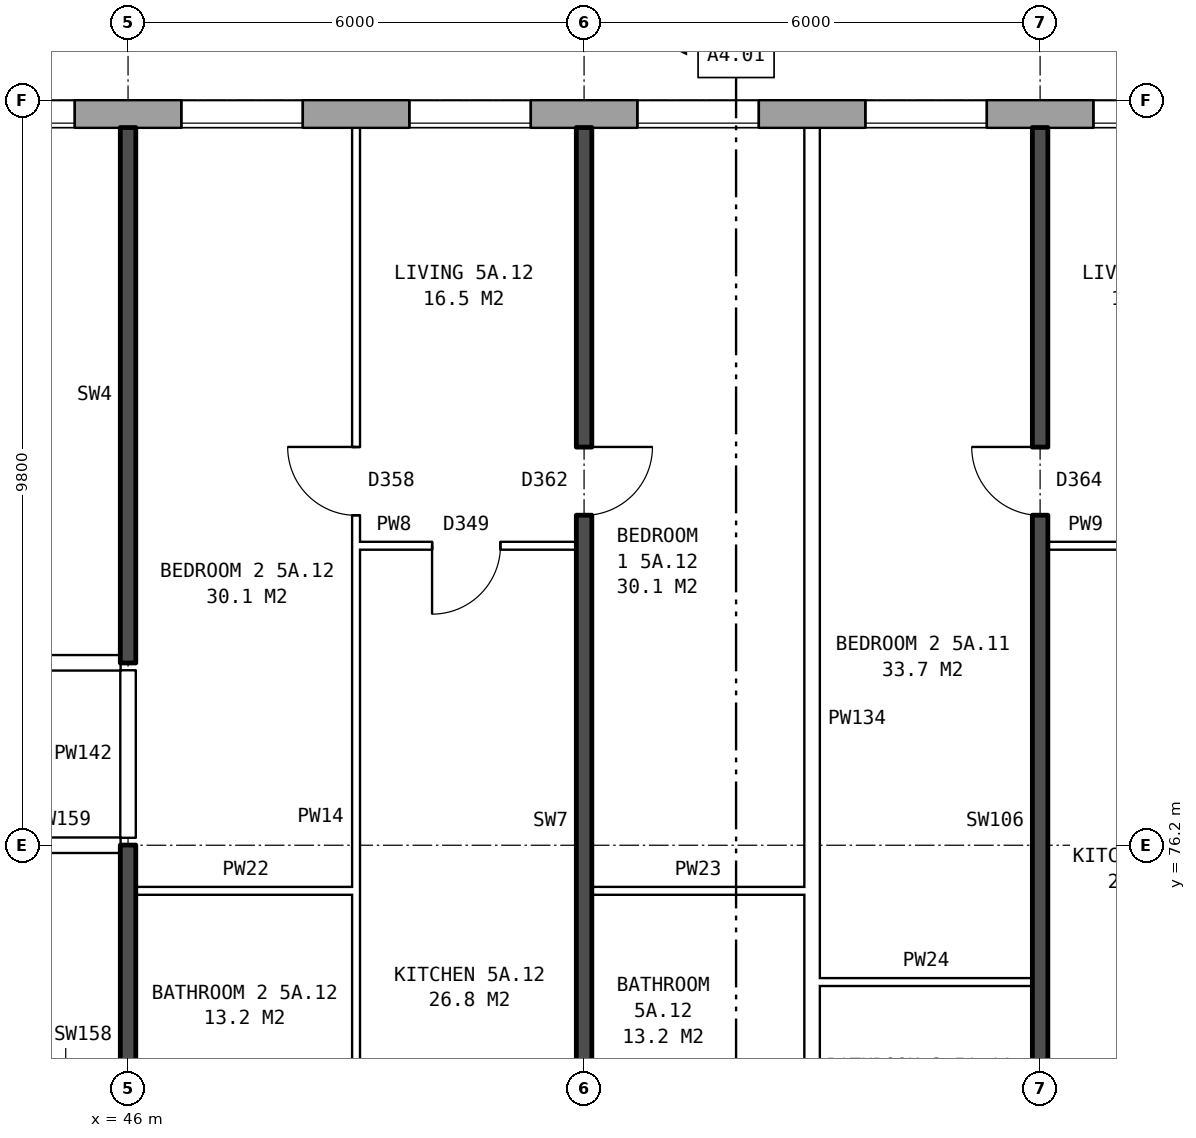
"""IFC4 building model, lengths in metres.
Left out: names, types, materials, properties, quantities, classifications, styles, units other than length and angle.
Written with IfcOpenShell. Run it as: python <this file> out.ifc"""

import sys

from ifc_helpers import new_model, si_unit, direction, frame, frame_2d, origin, place, context, subcontext, project, spatial, rectangle, extrude, element, fill, save


model = new_model("IFC4")
c1 = context("Model", 3, precision=1e-05, world=origin(), true_north=direction((0.0, 1.0)))
c2 = subcontext(c1, "Body", "Model", "MODEL_VIEW")
j1 = project(units=[si_unit("LENGTHUNIT", "METRE"), si_unit("PLANEANGLEUNIT", "RADIAN")], contexts=[c1])
p1 = place(None, origin())
s1 = spatial("IfcSite", under=j1, at=p1, CompositionType="ELEMENT")
p2 = place(p1, origin())
s2 = spatial("IfcBuilding", under=s1, at=p2, CompositionType="ELEMENT")
p3 = place(p2, frame((0.0, 0.0, 22.6)))
s3 = spatial("IfcBuildingStorey", under=s2, at=p3, CompositionType="ELEMENT", Elevation=22.6)
p4 = place(p3, frame((72.925, 85.82, 0.0), z_axis=(0.0, 0.0, 1.0), x_axis=(-1.0, 0.0, 0.0)))
e1 = element("IfcWall", 1, at=p4, inside=s3, PredefinedType="STANDARD", context=c2, shape_type="SweptSolid", body=[
    extrude(rectangle(XDim=50.101, YDim=0.36, at=frame_2d((25.05, 0.0))), origin(), (0.0, 0.0, 1.0), 2.85),
])
p5 = place(p4, frame((0.625, 0.0, 0.8)))
e2 = element("IfcOpeningElement", 2, at=p5, cuts=e1, PredefinedType="OPENING", context=c2, shape_type="SweptSolid", body=[
    extrude(rectangle(XDim=1.6, YDim=1.8, at=frame_2d((0.8, 0.9))), frame((0.0, 0.19, 0.0), z_axis=(0.0, -1.0, 0.0), x_axis=(1.0, 0.0, 0.0)), (0.0, 0.0, 1.0), 0.38),
])
p6 = place(p4, frame((3.125, 0.0, 1.7)))
e3 = element("IfcOpeningElement", 3, at=p6, cuts=e1, PredefinedType="OPENING", context=c2, shape_type="SweptSolid", body=[
    extrude(rectangle(XDim=0.8, YDim=0.9, at=frame_2d((0.4, 0.45))), frame((0.0, 0.19, 0.0), z_axis=(0.0, -1.0, 0.0), x_axis=(1.0, 0.0, 0.0)), (0.0, 0.0, 1.0), 0.38),
])
p7 = place(p4, frame((6.625, 0.0, 0.8)))
e4 = element("IfcOpeningElement", 4, at=p7, cuts=e1, PredefinedType="OPENING", context=c2, shape_type="SweptSolid", body=[
    extrude(rectangle(XDim=1.6, YDim=1.8, at=frame_2d((0.8, 0.9))), frame((0.0, 0.19, 0.0), z_axis=(0.0, -1.0, 0.0), x_axis=(1.0, 0.0, 0.0)), (0.0, 0.0, 1.0), 0.38),
])
p8 = place(p4, frame((9.625, 0.0, 0.8)))
e5 = element("IfcOpeningElement", 5, at=p8, cuts=e1, PredefinedType="OPENING", context=c2, shape_type="SweptSolid", body=[
    extrude(rectangle(XDim=1.6, YDim=1.8, at=frame_2d((0.8, 0.9))), frame((0.0, 0.19, 0.0), z_axis=(0.0, -1.0, 0.0), x_axis=(1.0, 0.0, 0.0)), (0.0, 0.0, 1.0), 0.38),
])
p9 = place(p4, frame((12.625, 0.0, 0.8)))
e6 = element("IfcOpeningElement", 6, at=p9, cuts=e1, PredefinedType="OPENING", context=c2, shape_type="SweptSolid", body=[
    extrude(rectangle(XDim=1.6, YDim=1.8, at=frame_2d((0.8, 0.9))), frame((0.0, 0.19, 0.0), z_axis=(0.0, -1.0, 0.0), x_axis=(1.0, 0.0, 0.0)), (0.0, 0.0, 1.0), 0.38),
])
p10 = place(p4, frame((15.625, 0.0, 0.8)))
e7 = element("IfcOpeningElement", 7, at=p10, cuts=e1, PredefinedType="OPENING", context=c2, shape_type="SweptSolid", body=[
    extrude(rectangle(XDim=1.6, YDim=1.8, at=frame_2d((0.8, 0.9))), frame((0.0, 0.19, 0.0), z_axis=(0.0, -1.0, 0.0), x_axis=(1.0, 0.0, 0.0)), (0.0, 0.0, 1.0), 0.38),
])
p11 = place(p4, frame((18.625, 0.0, 0.8)))
e8 = element("IfcOpeningElement", 8, at=p11, cuts=e1, PredefinedType="OPENING", context=c2, shape_type="SweptSolid", body=[
    extrude(rectangle(XDim=1.6, YDim=1.8, at=frame_2d((0.8, 0.9))), frame((0.0, 0.19, 0.0), z_axis=(0.0, -1.0, 0.0), x_axis=(1.0, 0.0, 0.0)), (0.0, 0.0, 1.0), 0.38),
])
p12 = place(p4, frame((21.625, 0.0, 0.8)))
e9 = element("IfcOpeningElement", 9, at=p12, cuts=e1, PredefinedType="OPENING", context=c2, shape_type="SweptSolid", body=[
    extrude(rectangle(XDim=1.6, YDim=1.8, at=frame_2d((0.8, 0.9))), frame((0.0, 0.19, 0.0), z_axis=(0.0, -1.0, 0.0), x_axis=(1.0, 0.0, 0.0)), (0.0, 0.0, 1.0), 0.38),
])
p13 = place(p4, frame((24.625, 0.0, 0.8)))
e10 = element("IfcOpeningElement", 10, at=p13, cuts=e1, PredefinedType="OPENING", context=c2, shape_type="SweptSolid", body=[
    extrude(rectangle(XDim=1.6, YDim=1.8, at=frame_2d((0.8, 0.9))), frame((0.0, 0.19, 0.0), z_axis=(0.0, -1.0, 0.0), x_axis=(1.0, 0.0, 0.0)), (0.0, 0.0, 1.0), 0.38),
])
p14 = place(p4, frame((27.625, 0.0, 0.8)))
e11 = element("IfcOpeningElement", 11, at=p14, cuts=e1, PredefinedType="OPENING", context=c2, shape_type="SweptSolid", body=[
    extrude(rectangle(XDim=1.6, YDim=1.8, at=frame_2d((0.8, 0.9))), frame((0.0, 0.19, 0.0), z_axis=(0.0, -1.0, 0.0), x_axis=(1.0, 0.0, 0.0)), (0.0, 0.0, 1.0), 0.38),
])
p15 = place(p4, frame((30.625, 0.0, 0.8)))
e12 = element("IfcOpeningElement", 12, at=p15, cuts=e1, PredefinedType="OPENING", context=c2, shape_type="SweptSolid", body=[
    extrude(rectangle(XDim=1.6, YDim=1.8, at=frame_2d((0.8, 0.9))), frame((0.0, 0.19, 0.0), z_axis=(0.0, -1.0, 0.0), x_axis=(1.0, 0.0, 0.0)), (0.0, 0.0, 1.0), 0.38),
])
p16 = place(p4, frame((33.625, 0.0, 0.8)))
e13 = element("IfcOpeningElement", 13, at=p16, cuts=e1, PredefinedType="OPENING", context=c2, shape_type="SweptSolid", body=[
    extrude(rectangle(XDim=1.6, YDim=1.8, at=frame_2d((0.8, 0.9))), frame((0.0, 0.19, 0.0), z_axis=(0.0, -1.0, 0.0), x_axis=(1.0, 0.0, 0.0)), (0.0, 0.0, 1.0), 0.38),
])
p17 = place(p4, frame((36.625, 0.0, 0.8)))
e14 = element("IfcOpeningElement", 14, at=p17, cuts=e1, PredefinedType="OPENING", context=c2, shape_type="SweptSolid", body=[
    extrude(rectangle(XDim=1.6, YDim=1.8, at=frame_2d((0.8, 0.9))), frame((0.0, 0.19, 0.0), z_axis=(0.0, -1.0, 0.0), x_axis=(1.0, 0.0, 0.0)), (0.0, 0.0, 1.0), 0.38),
])
p18 = place(p4, frame((39.625, 0.0, 0.8)))
e15 = element("IfcOpeningElement", 15, at=p18, cuts=e1, PredefinedType="OPENING", context=c2, shape_type="SweptSolid", body=[
    extrude(rectangle(XDim=1.6, YDim=1.8, at=frame_2d((0.8, 0.9))), frame((0.0, 0.19, 0.0), z_axis=(0.0, -1.0, 0.0), x_axis=(1.0, 0.0, 0.0)), (0.0, 0.0, 1.0), 0.38),
])
p19 = place(p4, frame((41.525, 0.0, 0.8)))
e16 = element("IfcOpeningElement", 16, at=p19, cuts=e1, PredefinedType="OPENING", context=c2, shape_type="SweptSolid", body=[
    extrude(rectangle(XDim=1.6, YDim=1.8, at=frame_2d((0.8, 0.9))), frame((0.0, 0.19, 0.0), z_axis=(0.0, -1.0, 0.0), x_axis=(1.0, 0.0, 0.0)), (0.0, 0.0, 1.0), 0.38),
])
p20 = place(p4, frame((46.525, 0.0, 1.4)))
e17 = element("IfcOpeningElement", 17, at=p20, cuts=e1, PredefinedType="OPENING", context=c2, shape_type="SweptSolid", body=[
    extrude(rectangle(XDim=1.0, YDim=1.2, at=frame_2d((0.5, 0.6))), frame((0.0, 0.19, 0.0), z_axis=(0.0, -1.0, 0.0), x_axis=(1.0, 0.0, 0.0)), (0.0, 0.0, 1.0), 0.38),
])
p21 = place(p4, frame((5.475, 0.0, 0.8)))
e18 = element("IfcOpeningElement", 18, at=p21, cuts=e1, PredefinedType="OPENING", context=c2, shape_type="SweptSolid", body=[
    extrude(rectangle(XDim=0.8, YDim=0.9, at=frame_2d((0.4, 0.45))), frame((0.0, 0.19, 0.0), z_axis=(0.0, -1.0, 0.0), x_axis=(1.0, 0.0, 0.0)), (0.0, 0.0, 1.0), 0.38),
])
p22 = place(p4, frame((43.425, 0.0, 0.8)))
e19 = element("IfcOpeningElement", 19, at=p22, cuts=e1, PredefinedType="OPENING", context=c2, shape_type="SweptSolid", body=[
    extrude(rectangle(XDim=0.6, YDim=1.2, at=frame_2d((0.3, 0.6))), frame((0.0, 0.19, 0.0), z_axis=(0.0, -1.0, 0.0), x_axis=(1.0, 0.0, 0.0)), (0.0, 0.0, 1.0), 0.38),
])
p23 = place(p4, frame((47.825, 0.0, 0.8)))
e20 = element("IfcOpeningElement", 20, at=p23, cuts=e1, PredefinedType="OPENING", context=c2, shape_type="SweptSolid", body=[
    extrude(rectangle(XDim=1.4, YDim=1.8, at=frame_2d((0.7, 0.9))), frame((0.0, 0.19, 0.0), z_axis=(0.0, -1.0, 0.0), x_axis=(1.0, 0.0, 0.0)), (0.0, 0.0, 1.0), 0.38),
])
p24 = place(p3, frame((55.1, 74.4, 0.0), z_axis=(0.0, 0.0, 1.0), x_axis=(1.0, 0.0, 0.0)))
e21 = element("IfcWall", 21, at=p24, inside=s3, PredefinedType="PARTITIONING", context=c2, shape_type="SweptSolid", body=[
    extrude(rectangle(XDim=2.8, YDim=0.1, at=frame_2d((1.4, 0.0))), origin(), (0.0, 0.0, 1.0), 2.85),
])
p25 = place(p3, frame((46.1, 75.6, 0.0), z_axis=(0.0, 0.0, 1.0), x_axis=(1.0, 0.0, 0.0)))
e22 = element("IfcWall", 22, at=p25, inside=s3, PredefinedType="PARTITIONING", context=c2, shape_type="SweptSolid", body=[
    extrude(rectangle(XDim=2.9, YDim=0.1, at=frame_2d((1.45, 0.0))), origin(), (0.0, 0.0, 1.0), 2.85),
])
p26 = place(p3, frame((52.1, 75.6, 0.0), z_axis=(0.0, 0.0, 1.0), x_axis=(1.0, 0.0, 0.0)))
e23 = element("IfcWall", 23, at=p26, inside=s3, PredefinedType="PARTITIONING", context=c2, shape_type="SweptSolid", body=[
    extrude(rectangle(XDim=2.8, YDim=0.1, at=frame_2d((1.4, 0.0))), origin(), (0.0, 0.0, 1.0), 2.85),
])
p27 = place(p3, frame((44.36, 76.2, 0.0), z_axis=(0.0, 0.0, 1.0), x_axis=(1.0, 0.0, 0.0)))
e24 = element("IfcWall", 24, at=p27, inside=s3, PredefinedType="PARTITIONING", context=c2, shape_type="SweptSolid", body=[
    extrude(rectangle(XDim=1.54, YDim=0.2, at=frame_2d((0.77, 0.0))), origin(), (0.0, 0.0, 1.0), 2.85),
])
p28 = place(p3, frame((20.11, 78.6, 0.0), z_axis=(0.0, 0.0, 1.0), x_axis=(1.0, 0.0, 0.0)))
e25 = element("IfcWall", 25, at=p28, inside=s3, PredefinedType="PARTITIONING", context=c2, shape_type="SweptSolid", body=[
    extrude(rectangle(XDim=25.79, YDim=0.2, at=frame_2d((12.895, 0.0))), origin(), (0.0, 0.0, 1.0), 2.85),
])
p29 = place(p28, frame((22.34, 0.0, 0.0)))
e26 = element("IfcOpeningElement", 26, at=p29, cuts=e25, PredefinedType="OPENING", context=c2, shape_type="SweptSolid", body=[
    extrude(rectangle(XDim=1.0, YDim=2.1, at=frame_2d((0.5, 1.05))), frame((0.0, 0.11, 0.0), z_axis=(0.0, -1.0, 0.0), x_axis=(1.0, 0.0, 0.0)), (0.0, 0.0, 1.0), 0.22),
])
p30 = place(p28, frame((10.39, 0.0, 0.0)))
e27 = element("IfcOpeningElement", 27, at=p30, cuts=e25, PredefinedType="OPENING", context=c2, shape_type="SweptSolid", body=[
    extrude(rectangle(XDim=1.0, YDim=2.1, at=frame_2d((0.5, 1.05))), frame((0.0, 0.11, 0.0), z_axis=(0.0, -1.0, 0.0), x_axis=(1.0, 0.0, 0.0)), (0.0, 0.0, 1.0), 0.22),
])
p31 = place(p28, frame((2.245, 0.0, 0.0)))
e28 = element("IfcOpeningElement", 28, at=p31, cuts=e25, PredefinedType="OPENING", context=c2, shape_type="SweptSolid", body=[
    extrude(rectangle(XDim=1.0, YDim=2.1, at=frame_2d((0.5, 1.05))), frame((0.0, 0.11, 0.0), z_axis=(0.0, -1.0, 0.0), x_axis=(1.0, 0.0, 0.0)), (0.0, 0.0, 1.0), 0.22),
])
p32 = place(p3, frame((49.0, 80.14, 0.0), z_axis=(0.0, 0.0, 1.0), x_axis=(1.0, 0.0, 0.0)))
e29 = element("IfcWall", 29, at=p32, inside=s3, PredefinedType="PARTITIONING", context=c2, shape_type="SweptSolid", body=[
    extrude(rectangle(XDim=2.9, YDim=0.1, at=frame_2d((1.45, 0.0))), origin(), (0.0, 0.0, 1.0), 2.85),
])
p33 = place(p32, frame((1.0, 0.0, 0.0)))
e30 = element("IfcOpeningElement", 30, at=p33, cuts=e29, PredefinedType="OPENING", context=c2, shape_type="SweptSolid", body=[
    extrude(rectangle(XDim=0.9, YDim=2.1, at=frame_2d((0.45, 1.05))), frame((0.0, 0.06, 0.0), z_axis=(0.0, -1.0, 0.0), x_axis=(1.0, 0.0, 0.0)), (0.0, 0.0, 1.0), 0.12),
])
p34 = place(p3, frame((58.1, 80.14, 0.0), z_axis=(0.0, 0.0, 1.0), x_axis=(1.0, 0.0, 0.0)))
e31 = element("IfcWall", 31, at=p34, inside=s3, PredefinedType="PARTITIONING", context=c2, shape_type="SweptSolid", body=[
    extrude(rectangle(XDim=2.9, YDim=0.1, at=frame_2d((1.45, 0.0))), origin(), (0.0, 0.0, 1.0), 2.85),
])
p35 = place(p34, frame((1.0, 0.0, 0.0)))
e32 = element("IfcOpeningElement", 32, at=p35, cuts=e31, PredefinedType="OPENING", context=c2, shape_type="SweptSolid", body=[
    extrude(rectangle(XDim=0.9, YDim=2.1, at=frame_2d((0.45, 1.05))), frame((0.0, 0.06, 0.0), z_axis=(0.0, -1.0, 0.0), x_axis=(1.0, 0.0, 0.0)), (0.0, 0.0, 1.0), 0.12),
])
p36 = place(p3, frame((46.0, 71.2, 0.0), z_axis=(0.0, 0.0, 1.0), x_axis=(0.0, 1.0, 0.0)))
e33 = element("IfcWall", 33, at=p36, inside=s3, PredefinedType="SOLIDWALL", context=c2, shape_type="SweptSolid", body=[
    extrude(rectangle(XDim=5.0, YDim=0.2, at=frame_2d((2.5, 0.0))), origin(), (0.0, 0.0, 1.0), 2.85),
])
p37 = place(p3, frame((46.0, 76.3, 0.0), z_axis=(0.0, 0.0, 1.0), x_axis=(0.0, 1.0, 0.0)))
e34 = element("IfcWall", 34, at=p37, inside=s3, PredefinedType="PARTITIONING", context=c2, shape_type="SweptSolid", body=[
    extrude(rectangle(XDim=2.2, YDim=0.2, at=frame_2d((1.1, 0.0))), origin(), (0.0, 0.0, 1.0), 2.85),
])
p38 = place(p3, frame((46.0, 78.6, 0.0), z_axis=(0.0, 0.0, 1.0), x_axis=(0.0, 1.0, 0.0)))
e35 = element("IfcWall", 35, at=p38, inside=s3, PredefinedType="SOLIDWALL", context=c2, shape_type="SweptSolid", body=[
    extrude(rectangle(XDim=7.04, YDim=0.2, at=frame_2d((3.52, 0.0))), origin(), (0.0, 0.0, 1.0), 2.85),
])
p39 = place(p3, frame((49.0, 71.3, 0.0), z_axis=(0.0, 0.0, 1.0), x_axis=(0.0, 1.0, 0.0)))
e36 = element("IfcWall", 36, at=p39, inside=s3, PredefinedType="PARTITIONING", context=c2, shape_type="SweptSolid", body=[
    extrude(rectangle(XDim=14.34, YDim=0.1, at=frame_2d((7.17, 0.0))), origin(), (0.0, 0.0, 1.0), 2.85),
])
p40 = place(p39, frame((9.24, 0.0, 0.0)))
e37 = element("IfcOpeningElement", 37, at=p40, cuts=e36, PredefinedType="OPENING", context=c2, shape_type="SweptSolid", body=[
    extrude(rectangle(XDim=0.9, YDim=2.1, at=frame_2d((0.45, 1.05))), frame((0.0, 0.06, 0.0), z_axis=(0.0, -1.0, 0.0), x_axis=(1.0, 0.0, 0.0)), (0.0, 0.0, 1.0), 0.12),
])
p41 = place(p39, frame((0.4, 0.0, 0.0)))
e38 = element("IfcOpeningElement", 38, at=p41, cuts=e36, PredefinedType="OPENING", context=c2, shape_type="SweptSolid", body=[
    extrude(rectangle(XDim=0.9, YDim=2.1, at=frame_2d((0.45, 1.05))), frame((0.0, 0.06, 0.0), z_axis=(0.0, -1.0, 0.0), x_axis=(1.0, 0.0, 0.0)), (0.0, 0.0, 1.0), 0.12),
])
p42 = place(p3, frame((52.0, 71.2, 0.0), z_axis=(0.0, 0.0, 1.0), x_axis=(0.0, 1.0, 0.0)))
e39 = element("IfcWall", 39, at=p42, inside=s3, PredefinedType="SOLIDWALL", context=c2, shape_type="SweptSolid", body=[
    extrude(rectangle(XDim=14.44, YDim=0.2, at=frame_2d((7.22, 0.0))), origin(), (0.0, 0.0, 1.0), 2.85),
])
p43 = place(p42, frame((9.34, 0.0, 0.0)))
e40 = element("IfcOpeningElement", 40, at=p43, cuts=e39, PredefinedType="OPENING", context=c2, shape_type="SweptSolid", body=[
    extrude(rectangle(XDim=0.9, YDim=2.1, at=frame_2d((0.45, 1.05))), frame((0.0, 0.11, 0.0), z_axis=(0.0, -1.0, 0.0), x_axis=(1.0, 0.0, 0.0)), (0.0, 0.0, 1.0), 0.22),
])
p44 = place(p42, frame((0.4, 0.0, 0.0)))
e41 = element("IfcOpeningElement", 41, at=p44, cuts=e39, PredefinedType="OPENING", context=c2, shape_type="SweptSolid", body=[
    extrude(rectangle(XDim=0.9, YDim=2.1, at=frame_2d((0.45, 1.05))), frame((0.0, 0.11, 0.0), z_axis=(0.0, -1.0, 0.0), x_axis=(1.0, 0.0, 0.0)), (0.0, 0.0, 1.0), 0.22),
])
p45 = place(p3, frame((55.0, 71.3, 0.0), z_axis=(0.0, 0.0, 1.0), x_axis=(0.0, 1.0, 0.0)))
e42 = element("IfcWall", 42, at=p45, inside=s3, PredefinedType="PARTITIONING", context=c2, shape_type="SweptSolid", body=[
    extrude(rectangle(XDim=14.34, YDim=0.2, at=frame_2d((7.17, 0.0))), origin(), (0.0, 0.0, 1.0), 2.85),
])
p46 = place(p3, frame((58.0, 71.2, 0.0), z_axis=(0.0, 0.0, 1.0), x_axis=(0.0, 1.0, 0.0)))
e43 = element("IfcWall", 43, at=p46, inside=s3, PredefinedType="SOLIDWALL", context=c2, shape_type="SweptSolid", body=[
    extrude(rectangle(XDim=14.44, YDim=0.2, at=frame_2d((7.22, 0.0))), origin(), (0.0, 0.0, 1.0), 2.85),
])
p47 = place(p46, frame((9.34, 0.0, 0.0)))
e44 = element("IfcOpeningElement", 44, at=p47, cuts=e43, PredefinedType="OPENING", context=c2, shape_type="SweptSolid", body=[
    extrude(rectangle(XDim=0.9, YDim=2.1, at=frame_2d((0.45, 1.05))), frame((0.0, 0.11, 0.0), z_axis=(0.0, -1.0, 0.0), x_axis=(1.0, 0.0, 0.0)), (0.0, 0.0, 1.0), 0.22),
])
p48 = place(p46, frame((0.4, 0.0, 0.0)))
e45 = element("IfcOpeningElement", 45, at=p48, cuts=e43, PredefinedType="OPENING", context=c2, shape_type="SweptSolid", body=[
    extrude(rectangle(XDim=0.9, YDim=2.1, at=frame_2d((0.45, 1.05))), frame((0.0, 0.11, 0.0), z_axis=(0.0, -1.0, 0.0), x_axis=(1.0, 0.0, 0.0)), (0.0, 0.0, 1.0), 0.22),
])
p49 = place(p9, origin())
e46 = element("IfcWindow", 46, at=p49, inside=s3, PartitioningType="SINGLE_PANEL", PredefinedType="WINDOW", context=c2, shape_type="SweptSolid", body=[
    extrude(rectangle(XDim=1.6, YDim=1.8, at=frame_2d((0.8, 0.9))), frame((0.0, 0.15, 0.0), z_axis=(0.0, -1.0, 0.0), x_axis=(1.0, 0.0, 0.0)), (0.0, 0.0, 1.0), 0.06),
])
fill(e6, e46)
p50 = place(p10, origin())
e47 = element("IfcWindow", 47, at=p50, inside=s3, PartitioningType="SINGLE_PANEL", PredefinedType="WINDOW", context=c2, shape_type="SweptSolid", body=[
    extrude(rectangle(XDim=1.6, YDim=1.8, at=frame_2d((0.8, 0.9))), frame((0.0, 0.15, 0.0), z_axis=(0.0, -1.0, 0.0), x_axis=(1.0, 0.0, 0.0)), (0.0, 0.0, 1.0), 0.06),
])
fill(e7, e47)
p51 = place(p11, origin())
e48 = element("IfcWindow", 48, at=p51, inside=s3, PartitioningType="SINGLE_PANEL", PredefinedType="WINDOW", context=c2, shape_type="SweptSolid", body=[
    extrude(rectangle(XDim=1.6, YDim=1.8, at=frame_2d((0.8, 0.9))), frame((0.0, 0.15, 0.0), z_axis=(0.0, -1.0, 0.0), x_axis=(1.0, 0.0, 0.0)), (0.0, 0.0, 1.0), 0.06),
])
fill(e8, e48)
p52 = place(p12, origin())
e49 = element("IfcWindow", 49, at=p52, inside=s3, PartitioningType="SINGLE_PANEL", PredefinedType="WINDOW", context=c2, shape_type="SweptSolid", body=[
    extrude(rectangle(XDim=1.6, YDim=1.8, at=frame_2d((0.8, 0.9))), frame((0.0, 0.15, 0.0), z_axis=(0.0, -1.0, 0.0), x_axis=(1.0, 0.0, 0.0)), (0.0, 0.0, 1.0), 0.06),
])
fill(e9, e49)
p53 = place(p13, origin())
e50 = element("IfcWindow", 50, at=p53, inside=s3, PartitioningType="SINGLE_PANEL", PredefinedType="WINDOW", context=c2, shape_type="SweptSolid", body=[
    extrude(rectangle(XDim=1.6, YDim=1.8, at=frame_2d((0.8, 0.9))), frame((0.0, 0.15, 0.0), z_axis=(0.0, -1.0, 0.0), x_axis=(1.0, 0.0, 0.0)), (0.0, 0.0, 1.0), 0.06),
])
fill(e10, e50)
p54 = place(p14, origin())
e51 = element("IfcWindow", 51, at=p54, inside=s3, PartitioningType="SINGLE_PANEL", PredefinedType="WINDOW", context=c2, shape_type="SweptSolid", body=[
    extrude(rectangle(XDim=1.6, YDim=1.8, at=frame_2d((0.8, 0.9))), frame((0.0, 0.15, 0.0), z_axis=(0.0, -1.0, 0.0), x_axis=(1.0, 0.0, 0.0)), (0.0, 0.0, 1.0), 0.06),
])
fill(e11, e51)
p55 = place(p47, origin())
e52 = element("IfcDoor", 52, at=p55, inside=s3, OperationType="SINGLE_SWING_RIGHT", PredefinedType="DOOR", context=c2, shape_type="SweptSolid", body=[
    extrude(rectangle(XDim=0.9, YDim=2.1, at=frame_2d((0.45, 1.05))), frame((0.0, 0.025, 0.0), z_axis=(0.0, -1.0, 0.0), x_axis=(1.0, 0.0, 0.0)), (0.0, 0.0, 1.0), 0.05),
])
fill(e44, e52)
p56 = place(p43, frame((0.9, 0.0, 0.0), z_axis=(0.0, 0.0, 1.0), x_axis=(-1.0, 0.0, 0.0)))
e53 = element("IfcDoor", 53, at=p56, inside=s3, OperationType="SINGLE_SWING_LEFT", PredefinedType="DOOR", context=c2, shape_type="SweptSolid", body=[
    extrude(rectangle(XDim=0.9, YDim=2.1, at=frame_2d((0.45, 1.05))), frame((0.0, 0.025, 0.0), z_axis=(0.0, -1.0, 0.0), x_axis=(1.0, 0.0, 0.0)), (0.0, 0.0, 1.0), 0.05),
])
fill(e40, e53)
p57 = place(p40, origin())
e54 = element("IfcDoor", 54, at=p57, inside=s3, OperationType="SINGLE_SWING_RIGHT", PredefinedType="DOOR", context=c2, shape_type="SweptSolid", body=[
    extrude(rectangle(XDim=0.9, YDim=2.1, at=frame_2d((0.45, 1.05))), frame((0.0, 0.025, 0.0), z_axis=(0.0, -1.0, 0.0), x_axis=(1.0, 0.0, 0.0)), (0.0, 0.0, 1.0), 0.05),
])
fill(e37, e54)
p58 = place(p33, frame((0.9, 0.0, 0.0), z_axis=(0.0, 0.0, 1.0), x_axis=(-1.0, 0.0, 0.0)))
e55 = element("IfcDoor", 55, at=p58, inside=s3, OperationType="SINGLE_SWING_RIGHT", PredefinedType="DOOR", context=c2, shape_type="SweptSolid", body=[
    extrude(rectangle(XDim=0.9, YDim=2.1, at=frame_2d((0.45, 1.05))), frame((0.0, 0.025, 0.0), z_axis=(0.0, -1.0, 0.0), x_axis=(1.0, 0.0, 0.0)), (0.0, 0.0, 1.0), 0.05),
])
fill(e30, e55)
save(model, sys.argv[1])
